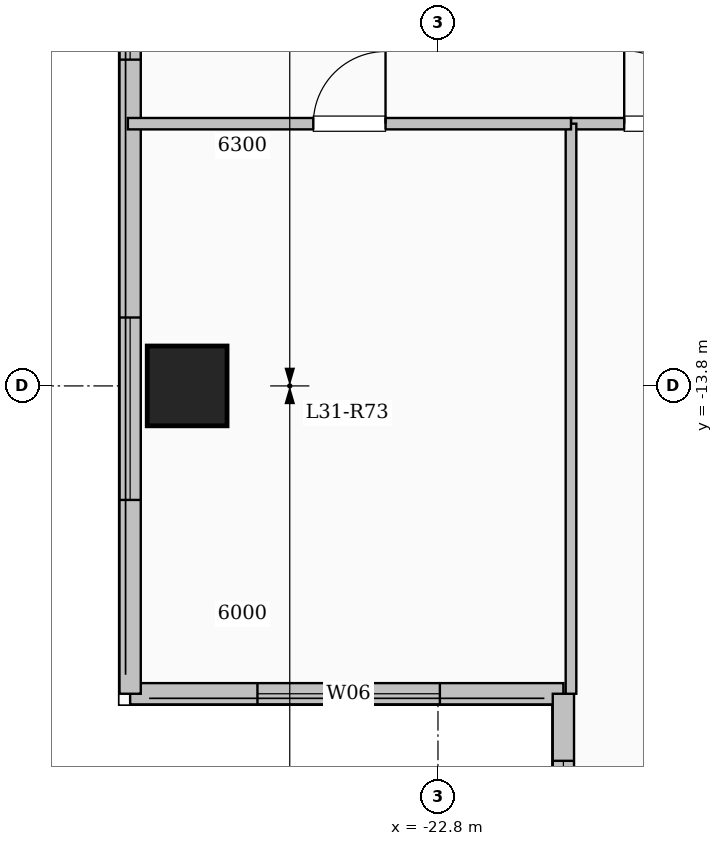
"""IFC4 building model, lengths in metres.
Left out: names, types, materials, properties, quantities, classifications, styles, units other than length and angle.
Written with IfcOpenShell. Run it as: python <this file> out.ifc"""

import sys

from ifc_helpers import new_model, si_unit, direction, frame, frame_2d, origin, origin_2d, place, context, subcontext, project, spatial, rectangle, extrude, element, fill, save


model = new_model("IFC4")
c1 = context("Model", 3, precision=1e-05, world=origin(), true_north=direction((0.0, 1.0)))
c2 = subcontext(c1, "Body", "Model", "MODEL_VIEW")
j1 = project(units=[si_unit("LENGTHUNIT", "METRE"), si_unit("PLANEANGLEUNIT", "RADIAN")], contexts=[c1])
p1 = place(None, origin())
s1 = spatial("IfcSite", under=j1, at=p1, CompositionType="ELEMENT")
p2 = place(p1, origin())
s2 = spatial("IfcBuilding", under=s1, at=p2, CompositionType="ELEMENT")
p3 = place(p2, frame((0.0, 0.0, 115.15)))
s3 = spatial("IfcBuildingStorey", under=s2, at=p3, CompositionType="ELEMENT", Elevation=115.15)
p4 = place(p3, frame((-26.1, -13.8, 0.0), z_axis=(0.0, 0.0, 1.0), x_axis=(1.0, 0.0, 0.0)))
e1 = element("IfcColumn", 1, at=p4, inside=s3, PredefinedType="COLUMN", context=c2, shape_type="SweptSolid", body=[
    extrude(rectangle(XDim=1.05, YDim=1.05, at=origin_2d()), origin(), (0.0, 0.0, 1.0), 3.35),
])
p5 = place(p3, frame((-21.15, -17.85, 0.0), z_axis=(0.0, 0.0, 1.0), x_axis=(-1.0, 0.0, 0.0)))
e2 = element("IfcWall", 2, at=p5, inside=s3, PredefinedType="SOLIDWALL", context=c2, shape_type="SweptSolid", body=[
    extrude(rectangle(XDim=5.7, YDim=0.28, at=frame_2d((2.85, 0.0))), origin(), (0.0, 0.0, 1.0), 3.05),
])
p6 = place(p5, frame((1.625, 0.0, 0.9)))
e3 = element("IfcOpeningElement", 3, at=p6, cuts=e2, PredefinedType="OPENING", context=c2, shape_type="SweptSolid", body=[
    extrude(rectangle(XDim=2.4, YDim=1.8, at=frame_2d((1.2, 0.9))), frame((0.0, 0.15, 0.0), z_axis=(0.0, -1.0, 0.0), x_axis=(1.0, 0.0, 0.0)), (0.0, 0.0, 1.0), 0.3),
])
p7 = place(p3, frame((-26.85, -17.85, 0.0), z_axis=(0.0, 0.0, 1.0), x_axis=(0.0, 1.0, 0.0)))
e4 = element("IfcWall", 4, at=p7, inside=s3, PredefinedType="SOLIDWALL", context=c2, shape_type="SweptSolid", body=[
    extrude(rectangle(XDim=35.7, YDim=0.28, at=frame_2d((17.85, 0.0))), origin(), (0.0, 0.0, 1.0), 3.05),
])
p8 = place(p7, frame((2.55, 0.0, 0.9)))
e5 = element("IfcOpeningElement", 5, at=p8, cuts=e4, PredefinedType="OPENING", context=c2, shape_type="SweptSolid", body=[
    extrude(rectangle(XDim=2.4, YDim=1.8, at=frame_2d((1.2, 0.9))), frame((0.0, 0.15, 0.0), z_axis=(0.0, -1.0, 0.0), x_axis=(1.0, 0.0, 0.0)), (0.0, 0.0, 1.0), 0.3),
])
p9 = place(p7, frame((8.343, 0.0, 0.9)))
e6 = element("IfcOpeningElement", 6, at=p9, cuts=e4, PredefinedType="OPENING", context=c2, shape_type="SweptSolid", body=[
    extrude(rectangle(XDim=1.5, YDim=1.65, at=frame_2d((0.75, 0.825))), frame((0.0, 0.15, 0.0), z_axis=(0.0, -1.0, 0.0), x_axis=(1.0, 0.0, 0.0)), (0.0, 0.0, 1.0), 0.3),
])
p10 = place(p7, frame((18.6, 0.0, 0.9)))
e7 = element("IfcOpeningElement", 7, at=p10, cuts=e4, PredefinedType="OPENING", context=c2, shape_type="SweptSolid", body=[
    extrude(rectangle(XDim=2.0, YDim=1.7, at=frame_2d((1.0, 0.85))), frame((0.0, 0.15, 0.0), z_axis=(0.0, -1.0, 0.0), x_axis=(1.0, 0.0, 0.0)), (0.0, 0.0, 1.0), 0.3),
])
p11 = place(p7, frame((28.975, 0.0, 0.95)))
e8 = element("IfcOpeningElement", 8, at=p11, cuts=e4, PredefinedType="OPENING", context=c2, shape_type="SweptSolid", body=[
    extrude(rectangle(XDim=1.0, YDim=1.5, at=frame_2d((0.5, 0.75))), frame((0.0, 0.15, 0.0), z_axis=(0.0, -1.0, 0.0), x_axis=(1.0, 0.0, 0.0)), (0.0, 0.0, 1.0), 0.3),
])
p12 = place(p7, frame((32.025, 0.0, 0.9)))
e9 = element("IfcOpeningElement", 9, at=p12, cuts=e4, PredefinedType="OPENING", context=c2, shape_type="SweptSolid", body=[
    extrude(rectangle(XDim=2.0, YDim=1.7, at=frame_2d((1.0, 0.85))), frame((0.0, 0.15, 0.0), z_axis=(0.0, -1.0, 0.0), x_axis=(1.0, 0.0, 0.0)), (0.0, 0.0, 1.0), 0.3),
])
p13 = place(p3, frame((-21.15, -22.05, 0.0), z_axis=(0.0, 0.0, 1.0), x_axis=(0.0, 1.0, 0.0)))
e10 = element("IfcWall", 10, at=p13, inside=s3, PredefinedType="SOLIDWALL", context=c2, shape_type="SweptSolid", body=[
    extrude(rectangle(XDim=4.2, YDim=0.28, at=frame_2d((2.1, 0.0))), origin(), (0.0, 0.0, 1.0), 3.05),
])
p14 = place(p13, frame((0.918, 0.0, 0.9)))
e11 = element("IfcOpeningElement", 11, at=p14, cuts=e10, PredefinedType="OPENING", context=c2, shape_type="SweptSolid", body=[
    extrude(rectangle(XDim=2.4, YDim=1.8, at=frame_2d((1.2, 0.9))), frame((0.0, 0.15, 0.0), z_axis=(0.0, -1.0, 0.0), x_axis=(1.0, 0.0, 0.0)), (0.0, 0.0, 1.0), 0.3),
])
p15 = place(p3, frame((-21.05, -10.35, 0.0), z_axis=(0.0, 0.0, 1.0), x_axis=(1.0, 0.0, 0.0)))
e12 = element("IfcWall", 12, at=p15, inside=s3, PredefinedType="PARTITIONING", context=c2, shape_type="SweptSolid", body=[
    extrude(rectangle(XDim=12.5, YDim=0.15, at=frame_2d((6.25, 0.0))), origin(), (0.0, 0.0, 1.0), 3.05),
])
p16 = place(p15, frame((0.7, 0.0, 0.0)))
e13 = element("IfcOpeningElement", 13, at=p16, cuts=e12, PredefinedType="OPENING", context=c2, shape_type="SweptSolid", body=[
    extrude(rectangle(XDim=0.96, YDim=2.15, at=frame_2d((0.48, 1.075))), frame((0.0, 0.085, 0.0), z_axis=(0.0, -1.0, 0.0), x_axis=(1.0, 0.0, 0.0)), (0.0, 0.0, 1.0), 0.17),
])
p17 = place(p3, frame((-21.05, -17.85, 0.0), z_axis=(0.0, 0.0, 1.0), x_axis=(0.0, 1.0, 0.0)))
e14 = element("IfcWall", 14, at=p17, inside=s3, PredefinedType="PARTITIONING", context=c2, shape_type="SweptSolid", body=[
    extrude(rectangle(XDim=7.5, YDim=0.14, at=frame_2d((3.75, 0.0))), origin(), (0.0, 0.0, 1.0), 3.05),
])
p18 = place(p3, frame((-26.88, -10.35, 0.0), z_axis=(0.0, 0.0, 1.0), x_axis=(1.0, 0.0, 0.0)))
e15 = element("IfcWall", 15, at=p18, inside=s3, PredefinedType="PARTITIONING", context=c2, shape_type="SweptSolid", body=[
    extrude(rectangle(XDim=5.83, YDim=0.15, at=frame_2d((2.915, 0.0))), origin(), (0.0, 0.0, 1.0), 3.05),
])
p19 = place(p18, frame((2.44, 0.0, 0.0)))
e16 = element("IfcOpeningElement", 16, at=p19, cuts=e15, PredefinedType="OPENING", context=c2, shape_type="SweptSolid", body=[
    extrude(rectangle(XDim=0.95, YDim=2.15, at=frame_2d((0.475, 1.075))), frame((0.0, 0.085, 0.0), z_axis=(0.0, -1.0, 0.0), x_axis=(1.0, 0.0, 0.0)), (0.0, 0.0, 1.0), 0.17),
])
p20 = place(p6, origin())
e17 = element("IfcWindow", 17, at=p20, inside=s3, PartitioningType="SINGLE_PANEL", PredefinedType="WINDOW", context=c2, shape_type="SweptSolid", body=[
    extrude(rectangle(XDim=2.4, YDim=1.8, at=frame_2d((1.2, 0.9))), frame((0.0, 0.03, 0.0), z_axis=(0.0, -1.0, 0.0), x_axis=(1.0, 0.0, 0.0)), (0.0, 0.0, 1.0), 0.06),
])
fill(e3, e17)
p21 = place(p8, origin())
e18 = element("IfcWindow", 18, at=p21, inside=s3, PartitioningType="SINGLE_PANEL", PredefinedType="WINDOW", context=c2, shape_type="SweptSolid", body=[
    extrude(rectangle(XDim=2.4, YDim=1.8, at=frame_2d((1.2, 0.9))), frame((0.0, 0.03, 0.0), z_axis=(0.0, -1.0, 0.0), x_axis=(1.0, 0.0, 0.0)), (0.0, 0.0, 1.0), 0.06),
])
fill(e5, e18)
p22 = place(p9, origin())
e19 = element("IfcWindow", 19, at=p22, inside=s3, PartitioningType="SINGLE_PANEL", PredefinedType="WINDOW", context=c2, shape_type="SweptSolid", body=[
    extrude(rectangle(XDim=1.5, YDim=1.65, at=frame_2d((0.75, 0.825))), frame((0.0, 0.03, 0.0), z_axis=(0.0, -1.0, 0.0), x_axis=(1.0, 0.0, 0.0)), (0.0, 0.0, 1.0), 0.06),
])
fill(e6, e19)
p23 = place(p14, origin())
e20 = element("IfcWindow", 20, at=p23, inside=s3, PartitioningType="SINGLE_PANEL", PredefinedType="WINDOW", context=c2, shape_type="SweptSolid", body=[
    extrude(rectangle(XDim=2.4, YDim=1.8, at=frame_2d((1.2, 0.9))), frame((0.0, 0.03, 0.0), z_axis=(0.0, -1.0, 0.0), x_axis=(1.0, 0.0, 0.0)), (0.0, 0.0, 1.0), 0.06),
])
fill(e11, e20)
p24 = place(p16, origin())
e21 = element("IfcDoor", 21, at=p24, inside=s3, OperationType="SINGLE_SWING_LEFT", PredefinedType="DOOR", context=c2, shape_type="SweptSolid", body=[
    extrude(rectangle(XDim=0.96, YDim=2.15, at=frame_2d((0.48, 1.075))), frame((0.0, 0.025, 0.0), z_axis=(0.0, -1.0, 0.0), x_axis=(1.0, 0.0, 0.0)), (0.0, 0.0, 1.0), 0.05),
])
fill(e13, e21)
p25 = place(p19, origin())
e22 = element("IfcDoor", 22, at=p25, inside=s3, OperationType="SINGLE_SWING_RIGHT", PredefinedType="DOOR", context=c2, shape_type="SweptSolid", body=[
    extrude(rectangle(XDim=0.95, YDim=2.15, at=frame_2d((0.475, 1.075))), frame((0.0, 0.025, 0.0), z_axis=(0.0, -1.0, 0.0), x_axis=(1.0, 0.0, 0.0)), (0.0, 0.0, 1.0), 0.05),
])
fill(e16, e22)
save(model, sys.argv[1])
